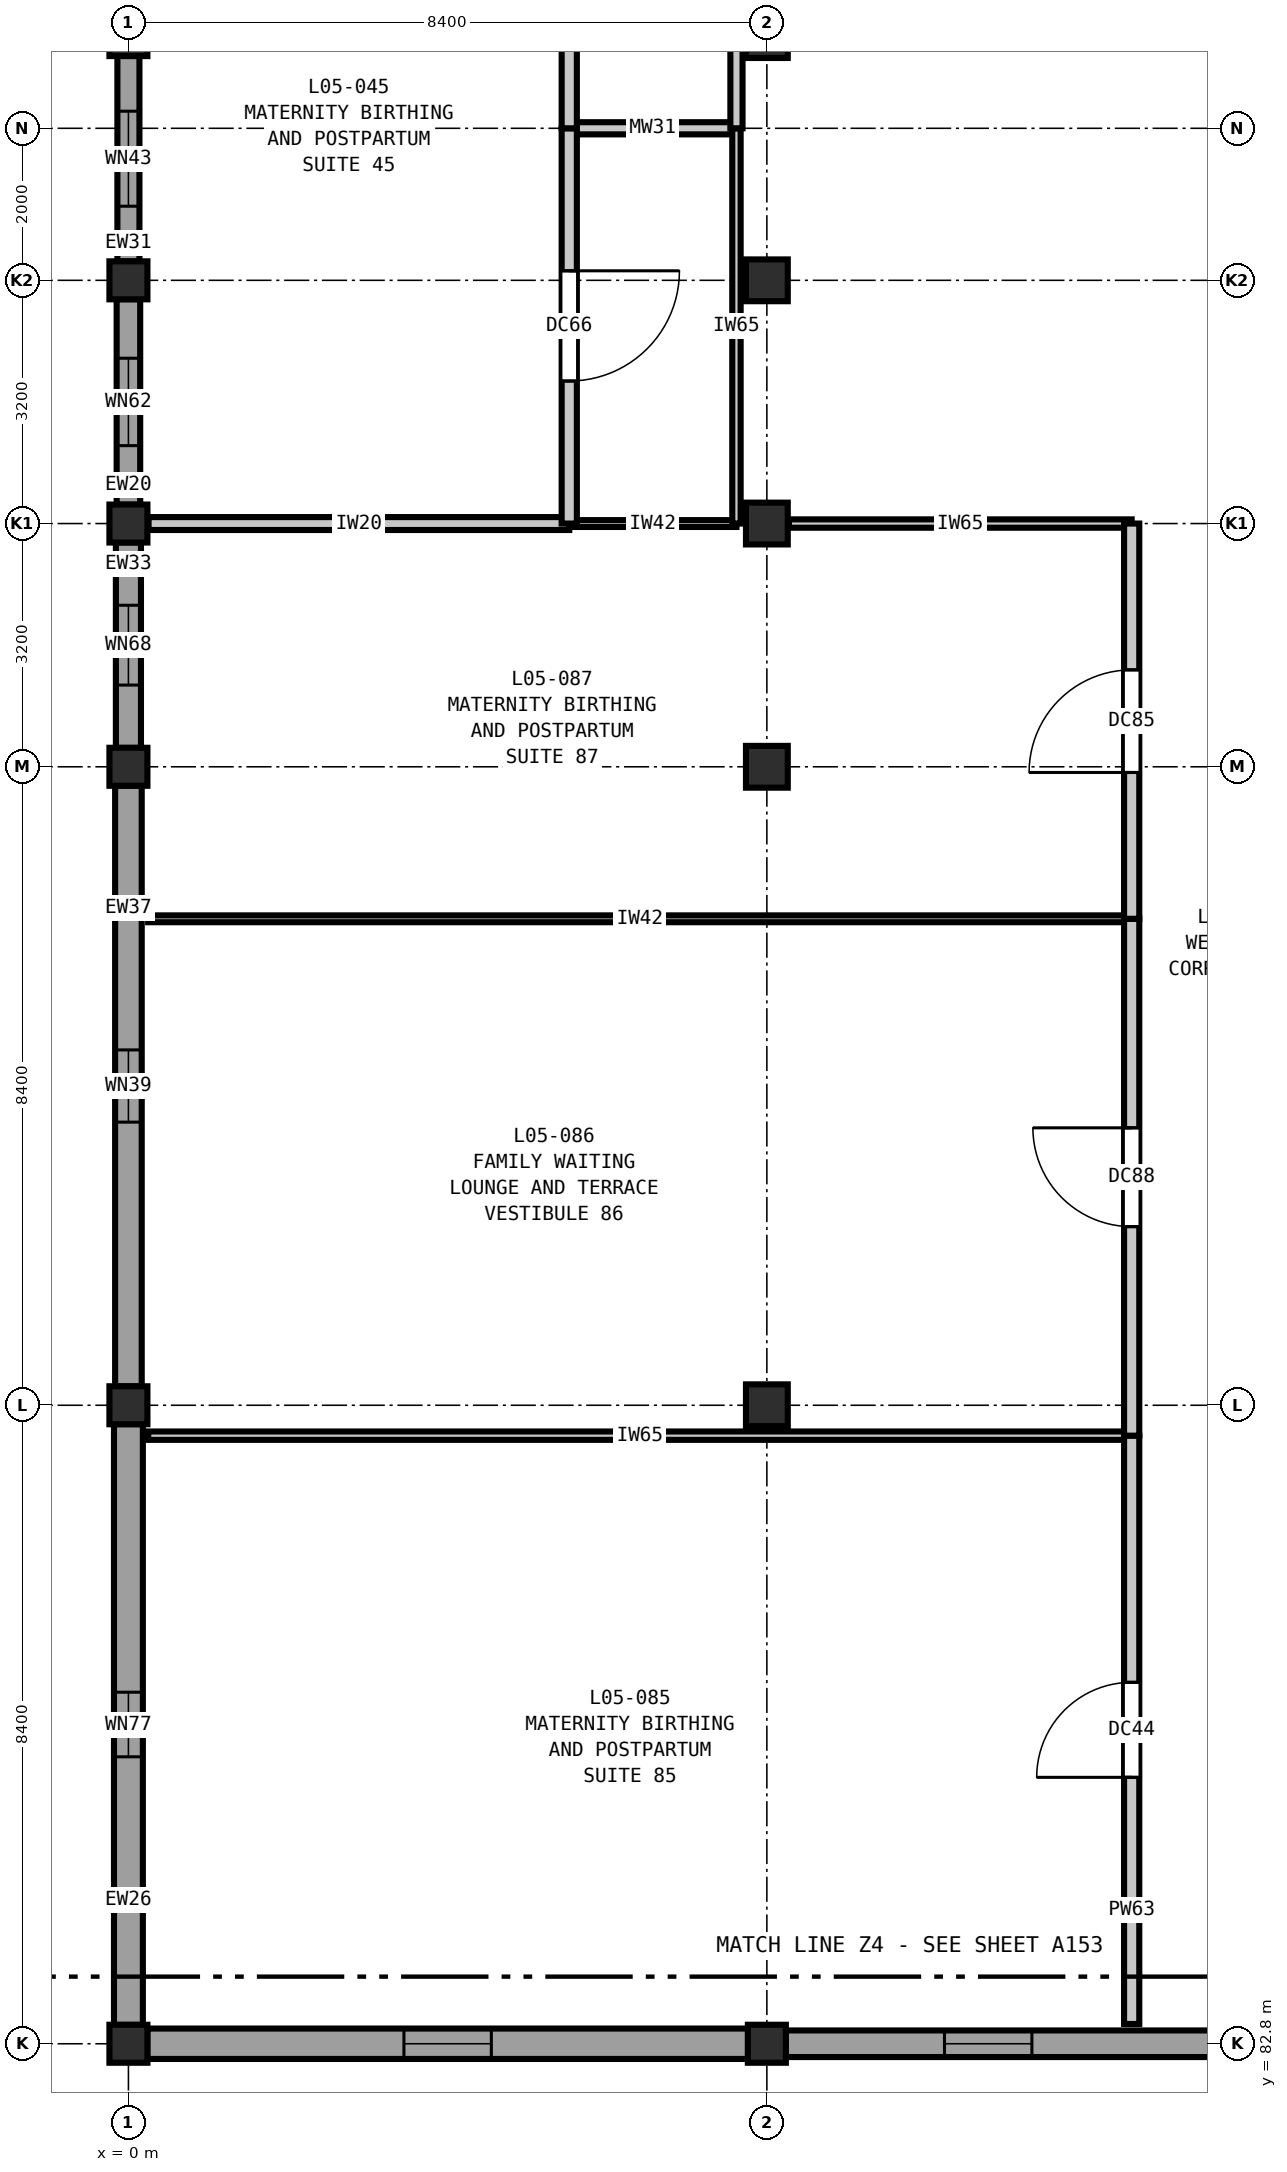
"""IFC4 building model, lengths in metres.
Left out: names, types, materials, properties, quantities, classifications, styles, units other than length and angle.
Written with IfcOpenShell. Run it as: python <this file> out.ifc"""

import sys

from ifc_helpers import new_model, si_unit, direction, frame, frame_2d, origin, origin_2d, place, context, subcontext, project, spatial, rectangle, extrude, element, fill, save


model = new_model("IFC4")
c1 = context("Model", 3, precision=1e-05, world=origin(), true_north=direction((0.0, 1.0)))
c2 = subcontext(c1, "Body", "Model", "MODEL_VIEW")
j1 = project(units=[si_unit("LENGTHUNIT", "METRE"), si_unit("PLANEANGLEUNIT", "RADIAN")], contexts=[c1])
p1 = place(None, origin())
s1 = spatial("IfcSite", under=j1, at=p1, CompositionType="ELEMENT")
p2 = place(p1, origin())
s2 = spatial("IfcBuilding", under=s1, at=p2, CompositionType="ELEMENT")
p3 = place(p2, frame((0.0, 0.0, 24.6)))
s3 = spatial("IfcBuildingStorey", under=s2, at=p3, CompositionType="ELEMENT", Elevation=24.6)
for number, where, z_axis, x_axis in (
    (1, (0.0, 82.8, 0.0), (0.0, 0.0, 1.0), (1.0, 0.0, 0.0)),
    (2, (0.0, 91.2, 0.0), (0.0, 0.0, 1.0), (1.0, 0.0, 0.0)),
    (3, (0.0, 99.6, 0.0), (0.0, 0.0, 1.0), (1.0, 0.0, 0.0)),
    (4, (0.0, 102.8, 0.0), (0.0, 0.0, 1.0), (1.0, 0.0, 0.0)),
    (5, (0.0, 106.0, 0.0), (0.0, 0.0, 1.0), (1.0, 0.0, 0.0)),
    (6, (0.0, 109.2, 0.0), (0.0, 0.0, 1.0), (1.0, 0.0, 0.0)),
    (7, (8.4, 82.8, 0.0), (0.0, 0.0, 1.0), (1.0, 0.0, 0.0)),
):
    element("IfcColumn", number, at=place(p3, frame(where, z_axis=z_axis, x_axis=x_axis)), inside=s3, PredefinedType="COLUMN", context=c2, shape_type="SweptSolid", body=[
        extrude(rectangle(XDim=0.5, YDim=0.5, at=origin_2d()), origin(), (0.0, 0.0, 1.0), 4.2),
    ])
for number, where, z_axis, x_axis in (
    (8, (8.4, 91.2, 0.0), (0.0, 0.0, 1.0), (1.0, 0.0, 0.0)),
    (9, (8.4, 99.6, 0.0), (0.0, 0.0, 1.0), (1.0, 0.0, 0.0)),
    (10, (8.4, 102.8, 0.0), (0.0, 0.0, 1.0), (1.0, 0.0, 0.0)),
    (11, (8.4, 106.0, 0.0), (0.0, 0.0, 1.0), (1.0, 0.0, 0.0)),
    (12, (8.4, 109.2, 0.0), (0.0, 0.0, 1.0), (1.0, 0.0, 0.0)),
):
    element("IfcColumn", number, at=place(p3, frame(where, z_axis=z_axis, x_axis=x_axis)), inside=s3, PredefinedType="COLUMN", context=c2, shape_type="SweptSolid", body=[
        extrude(rectangle(XDim=0.55, YDim=0.55, at=origin_2d()), origin(), (0.0, 0.0, 1.0), 4.2),
    ])
p4 = place(p3, frame((16.552, 82.8, 0.0), z_axis=(0.0, 0.0, 1.0), x_axis=(-1.0, 0.0, 0.0)))
e13 = element("IfcWall", 13, at=p4, inside=s3, PredefinedType="SOLIDWALL", context=c2, shape_type="SweptSolid", body=[
    extrude(rectangle(XDim=7.904, YDim=0.35, at=frame_2d((3.952, 0.0))), origin(), (0.0, 0.0, 1.0), 3.48),
])
p5 = place(p4, frame((4.665, 0.0, 0.9)))
e14 = element("IfcOpeningElement", 14, at=p5, cuts=e13, PredefinedType="OPENING", context=c2, shape_type="SweptSolid", body=[
    extrude(rectangle(XDim=1.15, YDim=1.4, at=frame_2d((0.575, 0.7))), frame((0.0, 0.185, 0.0), z_axis=(0.0, -1.0, 0.0), x_axis=(1.0, 0.0, 0.0)), (0.0, 0.0, 1.0), 0.37),
])
p6 = place(p3, frame((8.152, 82.8, 0.0), z_axis=(0.0, 0.0, 1.0), x_axis=(-1.0, 0.0, 0.0)))
e15 = element("IfcWall", 15, at=p6, inside=s3, PredefinedType="SOLIDWALL", context=c2, shape_type="SweptSolid", body=[
    extrude(rectangle(XDim=7.904, YDim=0.4, at=frame_2d((3.952, 0.0))), origin(), (0.0, 0.0, 1.0), 3.48),
])
p7 = place(p6, frame((3.377, 0.0, 0.9)))
e16 = element("IfcOpeningElement", 16, at=p7, cuts=e15, PredefinedType="OPENING", context=c2, shape_type="SweptSolid", body=[
    extrude(rectangle(XDim=1.15, YDim=1.4, at=frame_2d((0.575, 0.7))), frame((0.0, 0.21, 0.0), z_axis=(0.0, -1.0, 0.0), x_axis=(1.0, 0.0, 0.0)), (0.0, 0.0, 1.0), 0.42),
])
p8 = place(p3, frame((0.0, 83.048, 0.0), z_axis=(0.0, 0.0, 1.0), x_axis=(0.0, 1.0, 0.0)))
e17 = element("IfcWall", 17, at=p8, inside=s3, PredefinedType="SOLIDWALL", context=c2, shape_type="SweptSolid", body=[
    extrude(rectangle(XDim=7.904, YDim=0.38, at=frame_2d((3.952, 0.0))), origin(), (0.0, 0.0, 1.0), 3.48),
])
p9 = place(p8, frame((3.527, 0.0, 0.9)))
e18 = element("IfcOpeningElement", 18, at=p9, cuts=e17, PredefinedType="OPENING", context=c2, shape_type="SweptSolid", body=[
    extrude(rectangle(XDim=0.85, YDim=1.4, at=frame_2d((0.425, 0.7))), frame((0.0, 0.2, 0.0), z_axis=(0.0, -1.0, 0.0), x_axis=(1.0, 0.0, 0.0)), (0.0, 0.0, 1.0), 0.4),
])
p10 = place(p3, frame((0.0, 91.448, 0.0), z_axis=(0.0, 0.0, 1.0), x_axis=(0.0, 1.0, 0.0)))
e19 = element("IfcWall", 19, at=p10, inside=s3, PredefinedType="SOLIDWALL", context=c2, shape_type="SweptSolid", body=[
    extrude(rectangle(XDim=7.904, YDim=0.35, at=frame_2d((3.952, 0.0))), origin(), (0.0, 0.0, 1.0), 3.48),
])
p11 = place(p10, frame((3.477, 0.0, 0.9)))
e20 = element("IfcOpeningElement", 20, at=p11, cuts=e19, PredefinedType="OPENING", context=c2, shape_type="SweptSolid", body=[
    extrude(rectangle(XDim=0.95, YDim=1.4, at=frame_2d((0.475, 0.7))), frame((0.0, 0.185, 0.0), z_axis=(0.0, -1.0, 0.0), x_axis=(1.0, 0.0, 0.0)), (0.0, 0.0, 1.0), 0.37),
])
p12 = place(p3, frame((0.0, 99.848, 0.0), z_axis=(0.0, 0.0, 1.0), x_axis=(0.0, 1.0, 0.0)))
e21 = element("IfcWall", 21, at=p12, inside=s3, PredefinedType="SOLIDWALL", context=c2, shape_type="SweptSolid", body=[
    extrude(rectangle(XDim=2.704, YDim=0.33, at=frame_2d((1.352, 0.0))), origin(), (0.0, 0.0, 1.0), 3.48),
])
p13 = place(p12, frame((0.827, 0.0, 0.9)))
e22 = element("IfcOpeningElement", 22, at=p13, cuts=e21, PredefinedType="OPENING", context=c2, shape_type="SweptSolid", body=[
    extrude(rectangle(XDim=1.05, YDim=1.4, at=frame_2d((0.525, 0.7))), frame((0.0, 0.175, 0.0), z_axis=(0.0, -1.0, 0.0), x_axis=(1.0, 0.0, 0.0)), (0.0, 0.0, 1.0), 0.35),
])
p14 = place(p3, frame((0.0, 103.048, 0.0), z_axis=(0.0, 0.0, 1.0), x_axis=(0.0, 1.0, 0.0)))
e23 = element("IfcWall", 23, at=p14, inside=s3, PredefinedType="SOLIDWALL", context=c2, shape_type="SweptSolid", body=[
    extrude(rectangle(XDim=2.704, YDim=0.31, at=frame_2d((1.352, 0.0))), origin(), (0.0, 0.0, 1.0), 3.48),
])
p15 = place(p14, frame((0.777, 0.0, 0.9)))
e24 = element("IfcOpeningElement", 24, at=p15, cuts=e23, PredefinedType="OPENING", context=c2, shape_type="SweptSolid", body=[
    extrude(rectangle(XDim=1.15, YDim=1.4, at=frame_2d((0.575, 0.7))), frame((0.0, 0.165, 0.0), z_axis=(0.0, -1.0, 0.0), x_axis=(1.0, 0.0, 0.0)), (0.0, 0.0, 1.0), 0.33),
])
p16 = place(p3, frame((0.0, 106.248, 0.0), z_axis=(0.0, 0.0, 1.0), x_axis=(0.0, 1.0, 0.0)))
e25 = element("IfcWall", 25, at=p16, inside=s3, PredefinedType="SOLIDWALL", context=c2, shape_type="SweptSolid", body=[
    extrude(rectangle(XDim=2.704, YDim=0.29, at=frame_2d((1.352, 0.0))), origin(), (0.0, 0.0, 1.0), 3.48),
])
p17 = place(p16, frame((0.727, 0.0, 0.9)))
e26 = element("IfcOpeningElement", 26, at=p17, cuts=e25, PredefinedType="OPENING", context=c2, shape_type="SweptSolid", body=[
    extrude(rectangle(XDim=1.25, YDim=1.4, at=frame_2d((0.625, 0.7))), frame((0.0, 0.155, 0.0), z_axis=(0.0, -1.0, 0.0), x_axis=(1.0, 0.0, 0.0)), (0.0, 0.0, 1.0), 0.31),
])
p18 = place(p3, frame((0.26, 90.8, 0.0), z_axis=(0.0, 0.0, 1.0), x_axis=(1.0, 0.0, 0.0)))
e27 = element("IfcWall", 27, at=p18, inside=s3, PredefinedType="PARTITIONING", context=c2, shape_type="SweptSolid", body=[
    extrude(rectangle(XDim=12.94, YDim=0.11, at=frame_2d((6.47, 0.0))), origin(), (0.0, 0.0, 1.0), 3.92),
])
p19 = place(p3, frame((0.26, 97.6, 0.0), z_axis=(0.0, 0.0, 1.0), x_axis=(1.0, 0.0, 0.0)))
e28 = element("IfcWall", 28, at=p19, inside=s3, PredefinedType="PARTITIONING", context=c2, shape_type="SweptSolid", body=[
    extrude(rectangle(XDim=12.94, YDim=0.09, at=frame_2d((6.47, 0.0))), origin(), (0.0, 0.0, 1.0), 3.92),
])
p20 = place(p3, frame((0.265, 102.8, 0.0), z_axis=(0.0, 0.0, 1.0), x_axis=(1.0, 0.0, 0.0)))
e29 = element("IfcWall", 29, at=p20, inside=s3, PredefinedType="PARTITIONING", context=c2, shape_type="SweptSolid", body=[
    extrude(rectangle(XDim=5.535, YDim=0.17, at=frame_2d((2.768, 0.0))), origin(), (0.0, 0.0, 1.0), 3.585),
])
p21 = place(p3, frame((5.8, 102.8, 0.0), z_axis=(0.0, 0.0, 1.0), x_axis=(1.0, 0.0, 0.0)))
e30 = element("IfcWall", 30, at=p21, inside=s3, PredefinedType="PARTITIONING", context=c2, shape_type="SweptSolid", body=[
    extrude(rectangle(XDim=2.2, YDim=0.09, at=frame_2d((1.1, 0.0))), origin(), (0.0, 0.0, 1.0), 3.585),
])
p22 = place(p3, frame((8.69, 102.8, 0.0), z_axis=(0.0, 0.0, 1.0), x_axis=(1.0, 0.0, 0.0)))
e31 = element("IfcWall", 31, at=p22, inside=s3, PredefinedType="PARTITIONING", context=c2, shape_type="SweptSolid", body=[
    extrude(rectangle(XDim=4.51, YDim=0.11, at=frame_2d((2.255, 0.0))), origin(), (0.0, 0.0, 1.0), 3.585),
])
p23 = place(p3, frame((5.8, 108.0, 0.0), z_axis=(0.0, 0.0, 1.0), x_axis=(1.0, 0.0, 0.0)))
e32 = element("IfcWall", 32, at=p23, inside=s3, PredefinedType="PLUMBINGWALL", context=c2, shape_type="SweptSolid", body=[
    extrude(rectangle(XDim=2.2, YDim=0.16, at=frame_2d((1.1, 0.0))), origin(), (0.0, 0.0, 1.0), 3.92),
])
p24 = place(p3, frame((5.8, 102.8, 0.0), z_axis=(0.0, 0.0, 1.0), x_axis=(0.0, 1.0, 0.0)))
e33 = element("IfcWall", 33, at=p24, inside=s3, PredefinedType="PARTITIONING", context=c2, shape_type="SweptSolid", body=[
    extrude(rectangle(XDim=5.2, YDim=0.2, at=frame_2d((2.6, 0.0))), origin(), (0.0, 0.0, 1.0), 3.92),
])
p25 = place(p24, frame((1.875, 0.0, 0.0)))
e34 = element("IfcOpeningElement", 34, at=p25, cuts=e33, PredefinedType="OPENING", context=c2, shape_type="SweptSolid", body=[
    extrude(rectangle(XDim=1.45, YDim=2.25, at=frame_2d((0.725, 1.125))), frame((0.0, 0.11, 0.0), z_axis=(0.0, -1.0, 0.0), x_axis=(1.0, 0.0, 0.0)), (0.0, 0.0, 1.0), 0.22),
])
p26 = place(p3, frame((5.8, 108.0, 0.0), z_axis=(0.0, 0.0, 1.0), x_axis=(0.0, 1.0, 0.0)))
e35 = element("IfcWall", 35, at=p26, inside=s3, PredefinedType="PARTITIONING", context=c2, shape_type="SweptSolid", body=[
    extrude(rectangle(XDim=5.2, YDim=0.2, at=frame_2d((2.6, 0.0))), origin(), (0.0, 0.0, 1.0), 3.92),
])
p27 = place(p26, frame((2.14, 0.0, 0.0)))
e36 = element("IfcOpeningElement", 36, at=p27, cuts=e35, PredefinedType="OPENING", context=c2, shape_type="SweptSolid", body=[
    extrude(rectangle(XDim=0.92, YDim=2.1, at=frame_2d((0.46, 1.05))), frame((0.0, 0.11, 0.0), z_axis=(0.0, -1.0, 0.0), x_axis=(1.0, 0.0, 0.0)), (0.0, 0.0, 1.0), 0.22),
])
p28 = place(p3, frame((8.0, 102.8, 0.0), z_axis=(0.0, 0.0, 1.0), x_axis=(0.0, 1.0, 0.0)))
e37 = element("IfcWall", 37, at=p28, inside=s3, PredefinedType="PARTITIONING", context=c2, shape_type="SweptSolid", body=[
    extrude(rectangle(XDim=5.2, YDim=0.11, at=frame_2d((2.6, 0.0))), origin(), (0.0, 0.0, 1.0), 3.92),
])
p29 = place(p3, frame((8.0, 108.0, 0.0), z_axis=(0.0, 0.0, 1.0), x_axis=(0.0, 1.0, 0.0)))
e38 = element("IfcWall", 38, at=p29, inside=s3, PredefinedType="PLUMBINGWALL", context=c2, shape_type="SweptSolid", body=[
    extrude(rectangle(XDim=5.2, YDim=0.16, at=frame_2d((2.6, 0.0))), origin(), (0.0, 0.0, 1.0), 3.92),
])
p30 = place(p3, frame((13.2, 83.06, 0.0), z_axis=(0.0, 0.0, 1.0), x_axis=(0.0, 1.0, 0.0)))
e39 = element("IfcWall", 39, at=p30, inside=s3, PredefinedType="PARTITIONING", context=c2, shape_type="SweptSolid", body=[
    extrude(rectangle(XDim=7.74, YDim=0.2, at=frame_2d((3.87, 0.0))), origin(), (0.0, 0.0, 1.0), 3.92),
])
p31 = place(p30, frame((3.245, 0.0, 0.0)))
e40 = element("IfcOpeningElement", 40, at=p31, cuts=e39, PredefinedType="OPENING", context=c2, shape_type="SweptSolid", body=[
    extrude(rectangle(XDim=1.25, YDim=2.15, at=frame_2d((0.625, 1.075))), frame((0.0, 0.11, 0.0), z_axis=(0.0, -1.0, 0.0), x_axis=(1.0, 0.0, 0.0)), (0.0, 0.0, 1.0), 0.22),
])
p32 = place(p3, frame((13.2, 90.8, 0.0), z_axis=(0.0, 0.0, 1.0), x_axis=(0.0, 1.0, 0.0)))
e41 = element("IfcWall", 41, at=p32, inside=s3, PredefinedType="PARTITIONING", context=c2, shape_type="SweptSolid", body=[
    extrude(rectangle(XDim=6.8, YDim=0.2, at=frame_2d((3.4, 0.0))), origin(), (0.0, 0.0, 1.0), 3.92),
])
p33 = place(p32, frame((2.75, 0.0, 0.0)))
e42 = element("IfcOpeningElement", 42, at=p33, cuts=e41, PredefinedType="OPENING", context=c2, shape_type="SweptSolid", body=[
    extrude(rectangle(XDim=1.3, YDim=2.2, at=frame_2d((0.65, 1.1))), frame((0.0, 0.11, 0.0), z_axis=(0.0, -1.0, 0.0), x_axis=(1.0, 0.0, 0.0)), (0.0, 0.0, 1.0), 0.22),
])
p34 = place(p3, frame((13.2, 97.6, 0.0), z_axis=(0.0, 0.0, 1.0), x_axis=(0.0, 1.0, 0.0)))
e43 = element("IfcWall", 43, at=p34, inside=s3, PredefinedType="PARTITIONING", context=c2, shape_type="SweptSolid", body=[
    extrude(rectangle(XDim=5.2, YDim=0.2, at=frame_2d((2.6, 0.0))), origin(), (0.0, 0.0, 1.0), 3.92),
])
p35 = place(p34, frame((1.925, 0.0, 0.0)))
e44 = element("IfcOpeningElement", 44, at=p35, cuts=e43, PredefinedType="OPENING", context=c2, shape_type="SweptSolid", body=[
    extrude(rectangle(XDim=1.35, YDim=2.2, at=frame_2d((0.675, 1.1))), frame((0.0, 0.11, 0.0), z_axis=(0.0, -1.0, 0.0), x_axis=(1.0, 0.0, 0.0)), (0.0, 0.0, 1.0), 0.22),
])
p36 = place(p5, origin())
e45 = element("IfcWindow", 45, at=p36, inside=s3, PartitioningType="SINGLE_PANEL", PredefinedType="WINDOW", context=c2, shape_type="SweptSolid", body=[
    extrude(rectangle(XDim=1.15, YDim=1.4, at=frame_2d((0.575, 0.7))), frame((0.0, 0.03, 0.0), z_axis=(0.0, -1.0, 0.0), x_axis=(1.0, 0.0, 0.0)), (0.0, 0.0, 1.0), 0.06),
])
fill(e14, e45)
p37 = place(p7, origin())
e46 = element("IfcWindow", 46, at=p37, inside=s3, PartitioningType="SINGLE_PANEL", PredefinedType="WINDOW", context=c2, shape_type="SweptSolid", body=[
    extrude(rectangle(XDim=1.15, YDim=1.4, at=frame_2d((0.575, 0.7))), frame((0.0, 0.03, 0.0), z_axis=(0.0, -1.0, 0.0), x_axis=(1.0, 0.0, 0.0)), (0.0, 0.0, 1.0), 0.06),
])
fill(e16, e46)
p38 = place(p9, origin())
e47 = element("IfcWindow", 47, at=p38, inside=s3, PartitioningType="SINGLE_PANEL", PredefinedType="WINDOW", context=c2, shape_type="SweptSolid", body=[
    extrude(rectangle(XDim=0.85, YDim=1.4, at=frame_2d((0.425, 0.7))), frame((0.0, 0.03, 0.0), z_axis=(0.0, -1.0, 0.0), x_axis=(1.0, 0.0, 0.0)), (0.0, 0.0, 1.0), 0.06),
])
fill(e18, e47)
p39 = place(p11, origin())
e48 = element("IfcWindow", 48, at=p39, inside=s3, PartitioningType="SINGLE_PANEL", PredefinedType="WINDOW", context=c2, shape_type="SweptSolid", body=[
    extrude(rectangle(XDim=0.95, YDim=1.4, at=frame_2d((0.475, 0.7))), frame((0.0, 0.03, 0.0), z_axis=(0.0, -1.0, 0.0), x_axis=(1.0, 0.0, 0.0)), (0.0, 0.0, 1.0), 0.06),
])
fill(e20, e48)
p40 = place(p13, origin())
e49 = element("IfcWindow", 49, at=p40, inside=s3, PartitioningType="SINGLE_PANEL", PredefinedType="WINDOW", context=c2, shape_type="SweptSolid", body=[
    extrude(rectangle(XDim=1.05, YDim=1.4, at=frame_2d((0.525, 0.7))), frame((0.0, 0.03, 0.0), z_axis=(0.0, -1.0, 0.0), x_axis=(1.0, 0.0, 0.0)), (0.0, 0.0, 1.0), 0.06),
])
fill(e22, e49)
p41 = place(p15, origin())
e50 = element("IfcWindow", 50, at=p41, inside=s3, PartitioningType="SINGLE_PANEL", PredefinedType="WINDOW", context=c2, shape_type="SweptSolid", body=[
    extrude(rectangle(XDim=1.15, YDim=1.4, at=frame_2d((0.575, 0.7))), frame((0.0, 0.03, 0.0), z_axis=(0.0, -1.0, 0.0), x_axis=(1.0, 0.0, 0.0)), (0.0, 0.0, 1.0), 0.06),
])
fill(e24, e50)
p42 = place(p17, origin())
e51 = element("IfcWindow", 51, at=p42, inside=s3, PartitioningType="SINGLE_PANEL", PredefinedType="WINDOW", context=c2, shape_type="SweptSolid", body=[
    extrude(rectangle(XDim=1.25, YDim=1.4, at=frame_2d((0.625, 0.7))), frame((0.0, 0.03, 0.0), z_axis=(0.0, -1.0, 0.0), x_axis=(1.0, 0.0, 0.0)), (0.0, 0.0, 1.0), 0.06),
])
fill(e26, e51)
p43 = place(p25, frame((1.45, 0.0, 0.0), z_axis=(0.0, 0.0, 1.0), x_axis=(-1.0, 0.0, 0.0)))
e52 = element("IfcDoor", 52, at=p43, inside=s3, OperationType="SINGLE_SWING_LEFT", PredefinedType="DOOR", context=c2, shape_type="SweptSolid", body=[
    extrude(rectangle(XDim=1.45, YDim=2.25, at=frame_2d((0.725, 1.125))), frame((0.0, 0.025, 0.0), z_axis=(0.0, -1.0, 0.0), x_axis=(1.0, 0.0, 0.0)), (0.0, 0.0, 1.0), 0.05),
])
fill(e34, e52)
p44 = place(p31, origin())
e53 = element("IfcDoor", 53, at=p44, inside=s3, OperationType="SINGLE_SWING_LEFT", PredefinedType="DOOR", context=c2, shape_type="SweptSolid", body=[
    extrude(rectangle(XDim=1.25, YDim=2.15, at=frame_2d((0.625, 1.075))), frame((0.0, 0.025, 0.0), z_axis=(0.0, -1.0, 0.0), x_axis=(1.0, 0.0, 0.0)), (0.0, 0.0, 1.0), 0.05),
])
fill(e40, e53)
p45 = place(p33, origin())
e54 = element("IfcDoor", 54, at=p45, inside=s3, OperationType="SINGLE_SWING_RIGHT", PredefinedType="DOOR", context=c2, shape_type="SweptSolid", body=[
    extrude(rectangle(XDim=1.3, YDim=2.2, at=frame_2d((0.65, 1.1))), frame((0.0, 0.025, 0.0), z_axis=(0.0, -1.0, 0.0), x_axis=(1.0, 0.0, 0.0)), (0.0, 0.0, 1.0), 0.05),
])
fill(e42, e54)
p46 = place(p35, origin())
e55 = element("IfcDoor", 55, at=p46, inside=s3, OperationType="SINGLE_SWING_LEFT", PredefinedType="DOOR", context=c2, shape_type="SweptSolid", body=[
    extrude(rectangle(XDim=1.35, YDim=2.2, at=frame_2d((0.675, 1.1))), frame((0.0, 0.025, 0.0), z_axis=(0.0, -1.0, 0.0), x_axis=(1.0, 0.0, 0.0)), (0.0, 0.0, 1.0), 0.05),
])
fill(e44, e55)
save(model, sys.argv[1])
